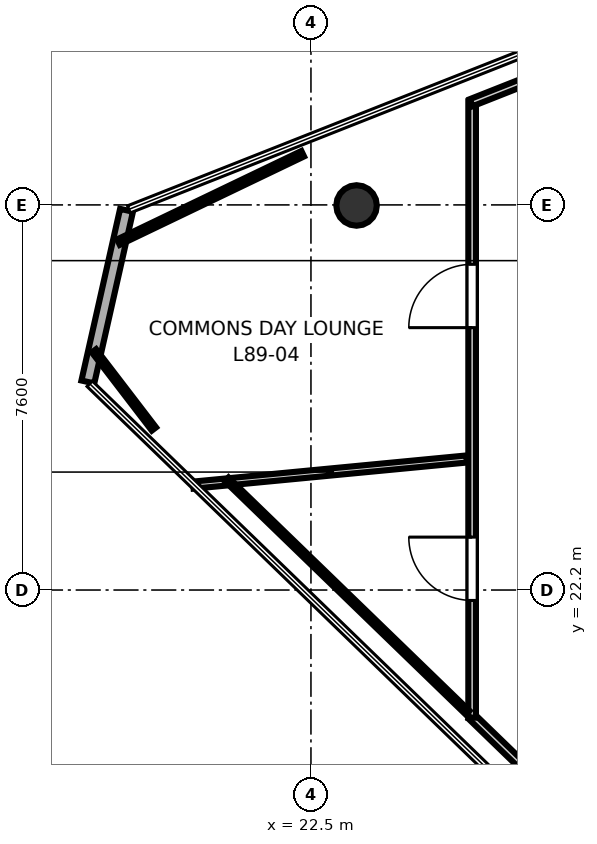
"""IFC4 building model, lengths in metres.
Left out: names, types, materials, properties, quantities, classifications, styles, units other than length and angle.
Written with IfcOpenShell. Run it as: python <this file> out.ifc"""

import sys

from ifc_helpers import new_model, si_unit, direction, frame, frame_2d, origin, origin_2d, place, context, subcontext, project, spatial, rectangle, hollow_circle, extrude, element, fill, save


model = new_model("IFC4")
c1 = context("Model", 3, precision=1e-05, world=origin(), true_north=direction((0.0, 1.0)))
c2 = subcontext(c1, "Body", "Model", "MODEL_VIEW")
j1 = project(units=[si_unit("LENGTHUNIT", "METRE"), si_unit("PLANEANGLEUNIT", "RADIAN")], contexts=[c1])
p1 = place(None, origin())
s1 = spatial("IfcSite", under=j1, at=p1, CompositionType="ELEMENT")
p2 = place(p1, origin())
s2 = spatial("IfcBuilding", under=s1, at=p2, CompositionType="ELEMENT")
p3 = place(p2, frame((0.0, 0.0, 344.4)))
s3 = spatial("IfcBuildingStorey", under=s2, at=p3, CompositionType="ELEMENT", Elevation=344.4)
p4 = place(p3, frame((23.4, 29.789, 0.0), z_axis=(0.0, 0.0, 1.0), x_axis=(1.0, 0.0, 0.0)))
e1 = element("IfcColumn", 1, at=p4, inside=s3, PredefinedType="COLUMN", context=c2, shape_type="SweptSolid", body=[
    extrude(hollow_circle(Radius=0.4, WallThickness=0.022, at=origin_2d()), origin(), (0.0, 0.0, 1.0), 3.7),
])
p5 = place(p3, frame((18.86, 29.694, 0.0), z_axis=(0.0, 0.0, 1.0), x_axis=(-0.219758092105, -0.975554396717, 0.0)))
e2 = element("IfcWall", 2, at=p5, inside=s3, PredefinedType="SOLIDWALL", context=c2, shape_type="SweptSolid", body=[
    extrude(rectangle(XDim=3.473, YDim=0.26, at=frame_2d((1.736, 0.0))), origin(), (0.0, 0.0, 1.0), 3.52),
])
p6 = place(p3, frame((27.097, 18.322, 0.0), z_axis=(0.0, 0.0, 1.0), x_axis=(-0.718332421604, 0.695700030238, 0.0)))
e3 = element("IfcWall", 3, at=p6, inside=s3, PredefinedType="PARTITIONING", context=c2, shape_type="SweptSolid", body=[
    extrude(rectangle(XDim=1.985, YDim=0.15, at=frame_2d((0.992, 0.0))), origin(), (0.0, 0.0, 1.0), 2.84),
])
p7 = place(p3, frame((25.681, 19.681, 0.0), z_axis=(0.0, 0.0, 1.0), x_axis=(0.0, 1.0, 0.0)))
e4 = element("IfcWall", 4, at=p7, inside=s3, PredefinedType="PARTITIONING", context=c2, shape_type="SweptSolid", body=[
    extrude(rectangle(XDim=12.164, YDim=0.15, at=frame_2d((6.082, 0.0))), origin(), (0.0, 0.0, 1.0), 2.84),
])
p8 = place(p7, frame((2.313, 0.0, 0.0)))
e5 = element("IfcOpeningElement", 5, at=p8, cuts=e4, PredefinedType="OPENING", context=c2, shape_type="SweptSolid", body=[
    extrude(rectangle(XDim=1.25, YDim=2.2, at=frame_2d((0.625, 1.1))), frame((0.0, 0.085, 0.0), z_axis=(0.0, -1.0, 0.0), x_axis=(1.0, 0.0, 0.0)), (0.0, 0.0, 1.0), 0.17),
])
p9 = place(p7, frame((7.697, 0.0, 0.0)))
e6 = element("IfcOpeningElement", 6, at=p9, cuts=e4, PredefinedType="OPENING", context=c2, shape_type="SweptSolid", body=[
    extrude(rectangle(XDim=1.25, YDim=2.2, at=frame_2d((0.625, 1.1))), frame((0.0, 0.085, 0.0), z_axis=(0.0, -1.0, 0.0), x_axis=(1.0, 0.0, 0.0)), (0.0, 0.0, 1.0), 0.17),
])
p10 = place(p3, frame((25.661, 31.816, 0.0), z_axis=(0.0, 0.0, 1.0), x_axis=(0.929963469363, 0.367651935465, 0.0)))
e7 = element("IfcWall", 7, at=p10, inside=s3, PredefinedType="PARTITIONING", context=c2, shape_type="SweptSolid", body=[
    extrude(rectangle(XDim=2.118, YDim=0.15, at=frame_2d((1.059, 0.0))), origin(), (0.0, 0.0, 1.0), 2.84),
])
p11 = place(p3, frame((20.178, 24.27, 0.0), z_axis=(0.0, 0.0, 1.0), x_axis=(0.995455705066, 0.095225727884, 0.0)))
e8 = element("IfcWall", 8, at=p11, inside=s3, PredefinedType="PARTITIONING", context=c2, shape_type="SweptSolid", body=[
    extrude(rectangle(XDim=5.42, YDim=0.14, at=frame_2d((2.71, 0.0))), origin(), (0.0, 0.0, 1.0), 2.84),
])
p12 = place(p3, frame((25.592, 19.781, 0.0), z_axis=(0.0, 0.0, 1.0), x_axis=(-0.718360050571, 0.695671501316, 0.0)))
e9 = element("IfcWall", 9, at=p12, inside=s3, PredefinedType="PARTITIONING", context=c2, shape_type="SweptSolid", body=[
    extrude(rectangle(XDim=6.618, YDim=0.105, at=frame_2d((3.309, 0.0))), origin(), (0.0, 0.0, 1.0), 2.84),
])
p13 = place(p3, frame((19.401, 25.378, 0.0), z_axis=(0.0, 0.0, 1.0), x_axis=(-0.608186329472, 0.793794298697, 0.0)))
e10 = element("IfcWall", 10, at=p13, inside=s3, PredefinedType="PARTITIONING", context=c2, shape_type="SweptSolid", body=[
    extrude(rectangle(XDim=1.944, YDim=0.105, at=frame_2d((0.972, 0.0))), origin(), (0.0, 0.0, 1.0), 2.84),
])
p14 = place(p3, frame((18.702, 29.065, 0.0), z_axis=(0.0, 0.0, 1.0), x_axis=(0.9015627341, 0.432648398219, 0.0)))
e11 = element("IfcWall", 11, at=p14, inside=s3, PredefinedType="PARTITIONING", context=c2, shape_type="SweptSolid", body=[
    extrude(rectangle(XDim=4.032, YDim=0.12, at=frame_2d((2.016, 0.0))), origin(), (0.0, 0.0, 1.0), 2.84),
])
p15 = place(p8, origin())
e12 = element("IfcDoor", 12, at=p15, inside=s3, OperationType="SINGLE_SWING_RIGHT", PredefinedType="DOOR", context=c2, shape_type="SweptSolid", body=[
    extrude(rectangle(XDim=1.25, YDim=2.2, at=frame_2d((0.625, 1.1))), frame((0.0, 0.025, 0.0), z_axis=(0.0, -1.0, 0.0), x_axis=(1.0, 0.0, 0.0)), (0.0, 0.0, 1.0), 0.05),
])
fill(e5, e12)
p16 = place(p9, origin())
e13 = element("IfcDoor", 13, at=p16, inside=s3, OperationType="SINGLE_SWING_LEFT", PredefinedType="DOOR", context=c2, shape_type="SweptSolid", body=[
    extrude(rectangle(XDim=1.25, YDim=2.2, at=frame_2d((0.625, 1.1))), frame((0.0, 0.025, 0.0), z_axis=(0.0, -1.0, 0.0), x_axis=(1.0, 0.0, 0.0)), (0.0, 0.0, 1.0), 0.05),
])
fill(e6, e13)
save(model, sys.argv[1])
